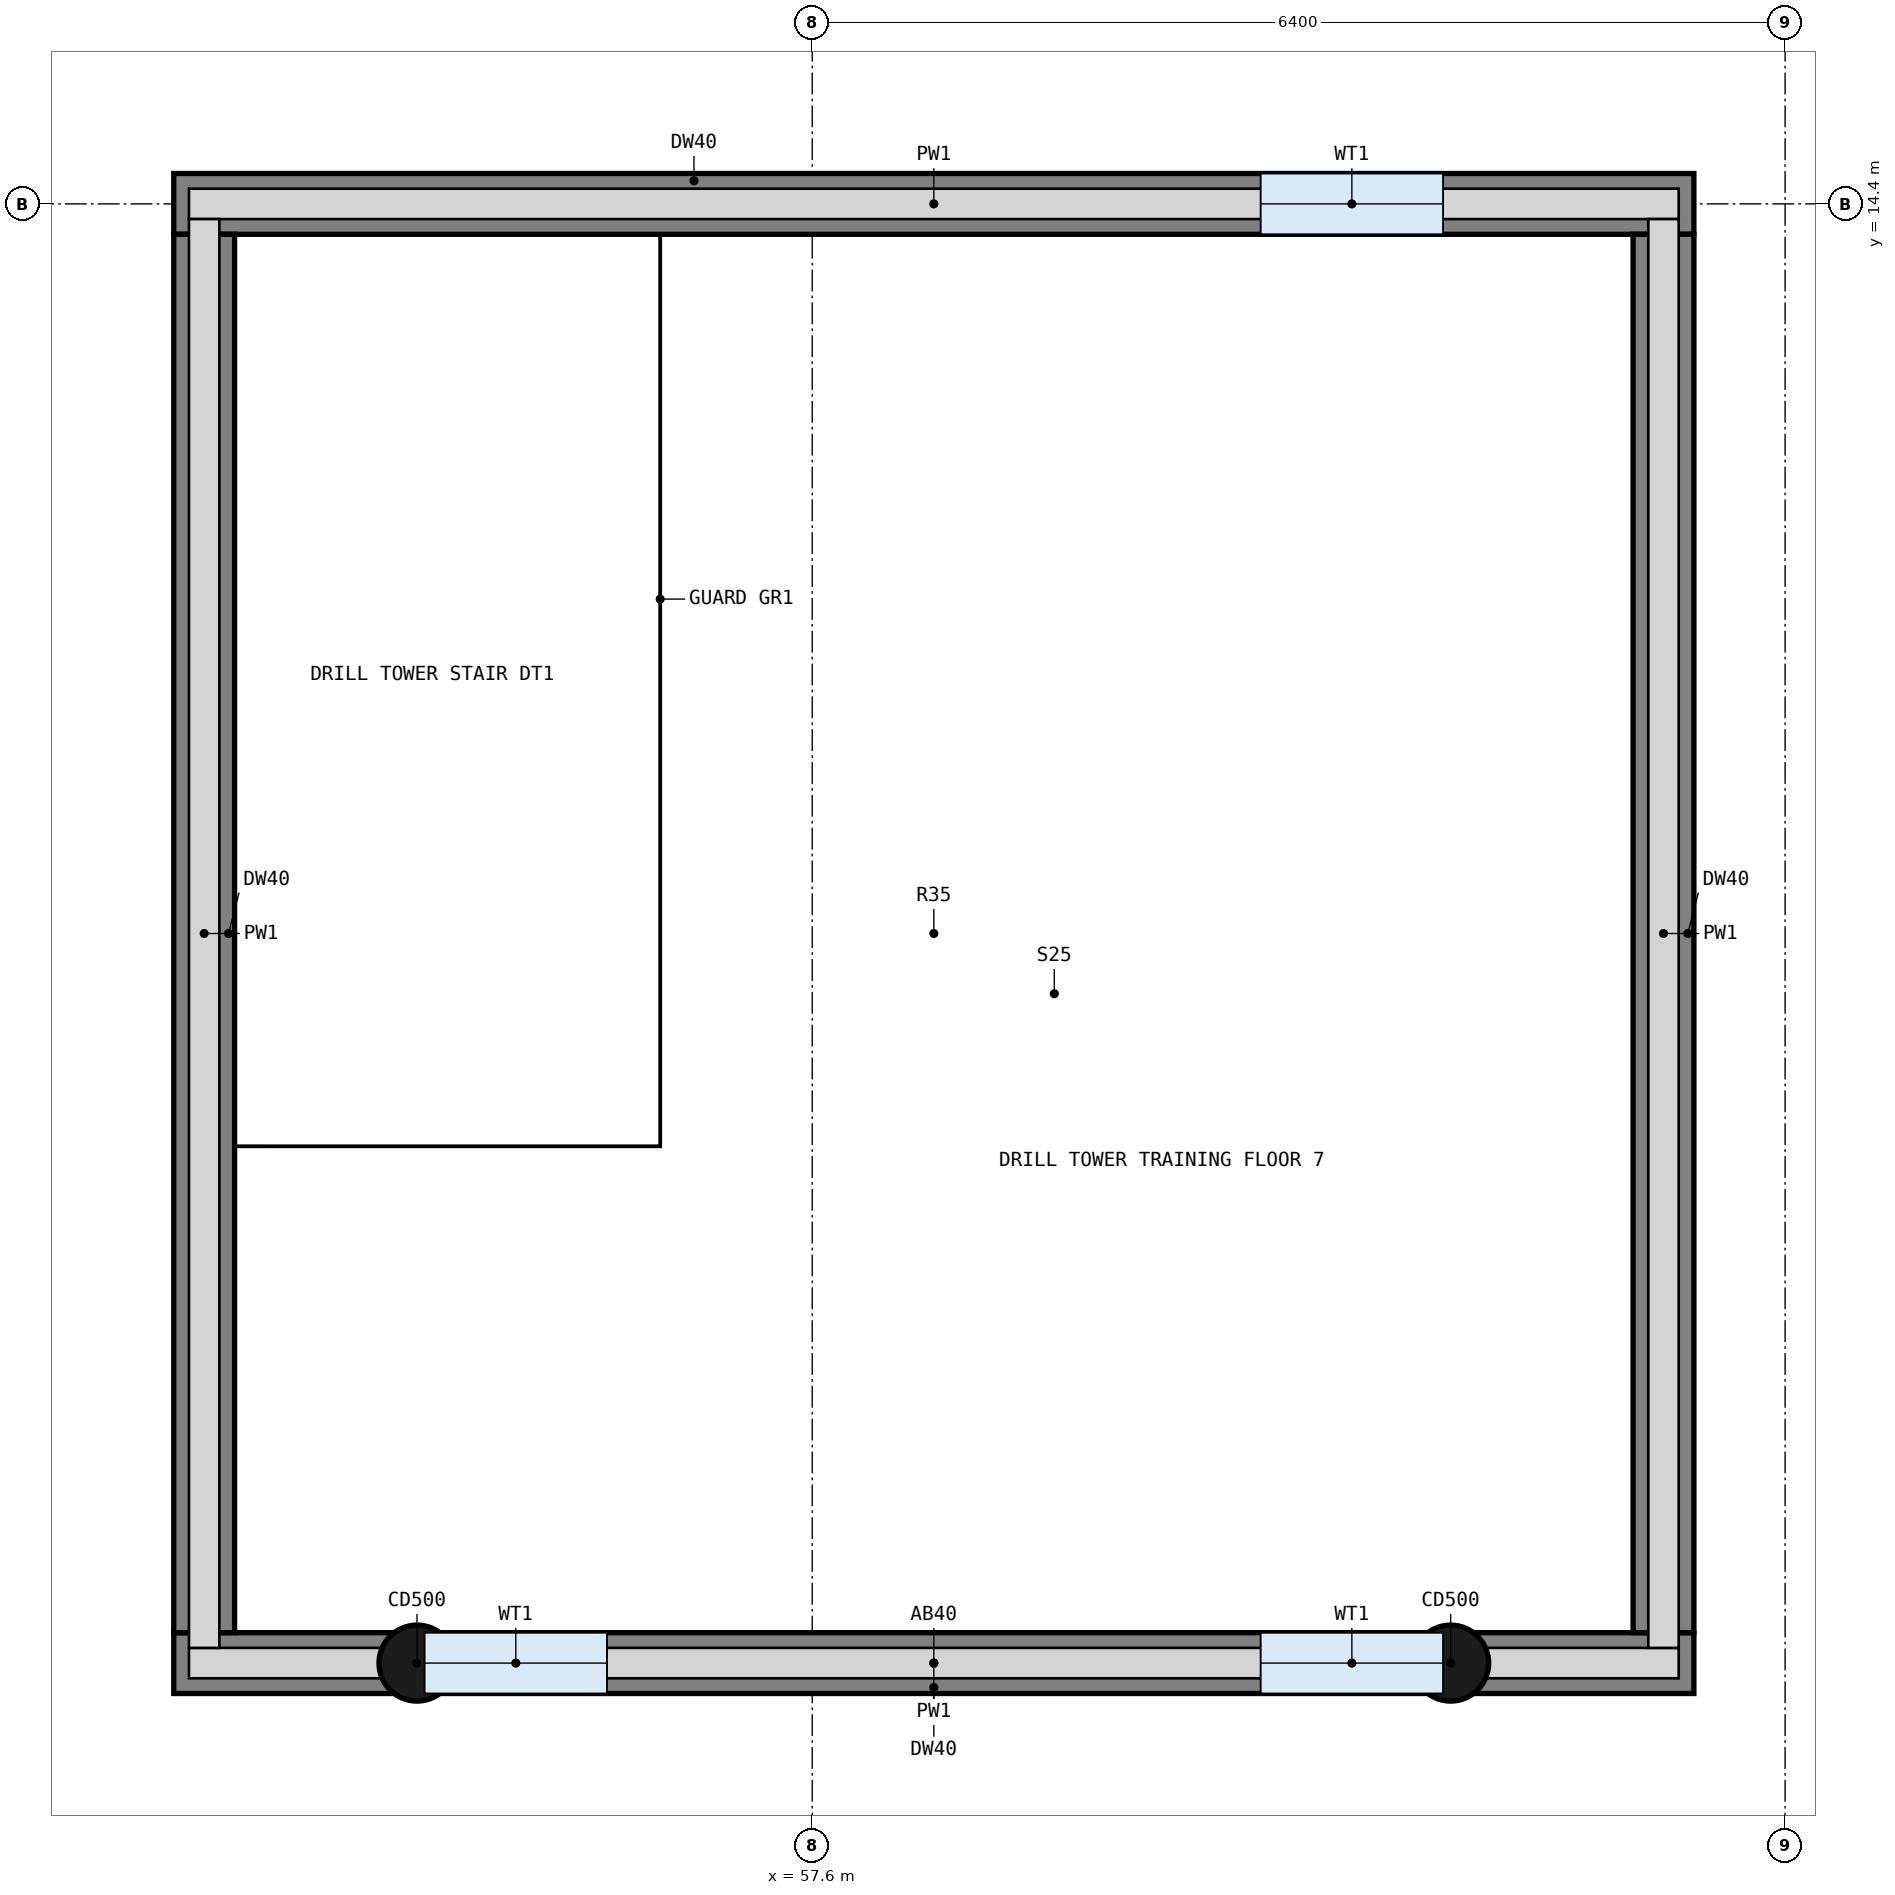
"""IFC4 building model, lengths in metres.
Left out: names, types, materials, properties, quantities, classifications, styles, units other than length and angle.
Written with IfcOpenShell. Run it as: python <this file> out.ifc"""

import sys

from ifc_helpers import new_model, si_unit, direction, frame, frame_2d, origin, origin_2d, place, context, subcontext, project, spatial, rectangle, circle, extrude, element, fill, save


model = new_model("IFC4")
c1 = context("Model", 3, precision=1e-05, world=origin(), true_north=direction((0.0, 1.0)))
c2 = subcontext(c1, "Body", "Model", "MODEL_VIEW")
j1 = project(units=[si_unit("LENGTHUNIT", "METRE"), si_unit("PLANEANGLEUNIT", "RADIAN")], contexts=[c1])
p1 = place(None, origin())
s1 = spatial("IfcSite", under=j1, at=p1, CompositionType="ELEMENT")
p2 = place(p1, origin())
s2 = spatial("IfcBuilding", under=s1, at=p2, CompositionType="ELEMENT")
p3 = place(p2, frame((0.0, 0.0, 24.9)))
s3 = spatial("IfcBuildingStorey", under=s2, at=p3, CompositionType="ELEMENT", Elevation=24.9)
p4 = place(p3, frame((53.4, 14.4, 0.0), z_axis=(0.0, 0.0, 1.0), x_axis=(1.0, 0.0, 0.0)))
e1 = element("IfcWall", 1, at=p4, inside=s3, PredefinedType="SHEAR", context=c2, shape_type="SweptSolid", body=[
    extrude(rectangle(XDim=10.0, YDim=0.4, at=frame_2d((5.0, 0.0))), origin(), (0.0, 0.0, 1.0), 3.9),
])
p5 = place(p4, frame((7.15, 0.0, 1.1)))
e2 = element("IfcOpeningElement", 2, at=p5, cuts=e1, PredefinedType="OPENING", context=c2, shape_type="SweptSolid", body=[
    extrude(rectangle(XDim=1.2, YDim=1.5, at=frame_2d((0.6, 0.75))), frame((0.0, 0.21, 0.0), z_axis=(0.0, -1.0, 0.0), x_axis=(1.0, 0.0, 0.0)), (0.0, 0.0, 1.0), 0.42),
])
p6 = place(p3, frame((53.4, 4.8, 0.0), z_axis=(0.0, 0.0, 1.0), x_axis=(1.0, 0.0, 0.0)))
e3 = element("IfcWall", 3, at=p6, inside=s3, PredefinedType="SHEAR", context=c2, shape_type="SweptSolid", body=[
    extrude(rectangle(XDim=10.0, YDim=0.4, at=frame_2d((5.0, 0.0))), origin(), (0.0, 0.0, 1.0), 3.9),
])
p7 = place(p6, frame((1.65, 0.0, 1.1)))
e4 = element("IfcOpeningElement", 4, at=p7, cuts=e3, PredefinedType="OPENING", context=c2, shape_type="SweptSolid", body=[
    extrude(rectangle(XDim=1.2, YDim=1.5, at=frame_2d((0.6, 0.75))), frame((0.0, 0.21, 0.0), z_axis=(0.0, -1.0, 0.0), x_axis=(1.0, 0.0, 0.0)), (0.0, 0.0, 1.0), 0.42),
])
p8 = place(p6, frame((7.15, 0.0, 1.1)))
e5 = element("IfcOpeningElement", 5, at=p8, cuts=e3, PredefinedType="OPENING", context=c2, shape_type="SweptSolid", body=[
    extrude(rectangle(XDim=1.2, YDim=1.5, at=frame_2d((0.6, 0.75))), frame((0.0, 0.21, 0.0), z_axis=(0.0, -1.0, 0.0), x_axis=(1.0, 0.0, 0.0)), (0.0, 0.0, 1.0), 0.42),
])
for number, where, z_axis, x_axis in (
    (6, (63.2, 5.0, 0.0), (0.0, 0.0, 1.0), (0.0, 1.0, 0.0)),
    (7, (53.6, 5.0, 0.0), (0.0, 0.0, 1.0), (0.0, 1.0, 0.0)),
):
    element("IfcWall", number, at=place(p3, frame(where, z_axis=z_axis, x_axis=x_axis)), inside=s3, PredefinedType="SHEAR", context=c2, shape_type="SweptSolid", body=[
        extrude(rectangle(XDim=9.2, YDim=0.4, at=frame_2d((4.6, 0.0))), origin(), (0.0, 0.0, 1.0), 3.9),
    ])
for number, where, z_axis, x_axis in (
    (8, (55.0, 4.8, 3.9), (0.0, 0.0, 1.0), (1.0, 0.0, 0.0)),
    (9, (61.8, 4.8, 3.9), (0.0, 0.0, 1.0), (1.0, 0.0, 0.0)),
):
    element("IfcColumn", number, at=place(p3, frame(where, z_axis=z_axis, x_axis=x_axis)), inside=s3, PredefinedType="COLUMN", context=c2, shape_type="SweptSolid", body=[
        extrude(circle(Radius=0.25, at=origin_2d()), origin(), (0.0, 0.0, 1.0), 3.0),
    ])
for number, where, z_axis, x_axis in (
    (10, (53.5, 14.4, 3.9), (0.0, 0.0, 1.0), (1.0, 0.0, 0.0)),
    (11, (53.5, 4.8, 3.9), (0.0, 0.0, 1.0), (1.0, 0.0, 0.0)),
):
    element("IfcWall", number, at=place(p3, frame(where, z_axis=z_axis, x_axis=x_axis)), inside=s3, PredefinedType="PARAPET", context=c2, shape_type="SweptSolid", body=[
        extrude(rectangle(XDim=9.8, YDim=0.2, at=frame_2d((4.9, 0.0))), origin(), (0.0, 0.0, 1.0), 1.1),
    ])
for number, where, z_axis, x_axis in (
    (12, (63.2, 4.9, 3.9), (0.0, 0.0, 1.0), (0.0, 1.0, 0.0)),
    (13, (53.6, 4.9, 3.9), (0.0, 0.0, 1.0), (0.0, 1.0, 0.0)),
):
    element("IfcWall", number, at=place(p3, frame(where, z_axis=z_axis, x_axis=x_axis)), inside=s3, PredefinedType="PARAPET", context=c2, shape_type="SweptSolid", body=[
        extrude(rectangle(XDim=9.4, YDim=0.2, at=frame_2d((4.7, 0.0))), origin(), (0.0, 0.0, 1.0), 1.1),
    ])
p9 = place(p7, origin())
e14 = element("IfcWindow", 14, at=p9, inside=s3, PartitioningType="SINGLE_PANEL", PredefinedType="WINDOW", context=c2, shape_type="SweptSolid", body=[
    extrude(rectangle(XDim=1.2, YDim=1.5, at=frame_2d((0.6, 0.75))), frame((0.0, 0.03, 0.0), z_axis=(0.0, -1.0, 0.0), x_axis=(1.0, 0.0, 0.0)), (0.0, 0.0, 1.0), 0.06),
])
fill(e4, e14)
p10 = place(p8, origin())
e15 = element("IfcWindow", 15, at=p10, inside=s3, PartitioningType="SINGLE_PANEL", PredefinedType="WINDOW", context=c2, shape_type="SweptSolid", body=[
    extrude(rectangle(XDim=1.2, YDim=1.5, at=frame_2d((0.6, 0.75))), frame((0.0, 0.03, 0.0), z_axis=(0.0, -1.0, 0.0), x_axis=(1.0, 0.0, 0.0)), (0.0, 0.0, 1.0), 0.06),
])
fill(e5, e15)
p11 = place(p5, origin())
e16 = element("IfcWindow", 16, at=p11, inside=s3, PartitioningType="SINGLE_PANEL", PredefinedType="WINDOW", context=c2, shape_type="SweptSolid", body=[
    extrude(rectangle(XDim=1.2, YDim=1.5, at=frame_2d((0.6, 0.75))), frame((0.0, 0.03, 0.0), z_axis=(0.0, -1.0, 0.0), x_axis=(1.0, 0.0, 0.0)), (0.0, 0.0, 1.0), 0.06),
])
fill(e2, e16)
save(model, sys.argv[1])
